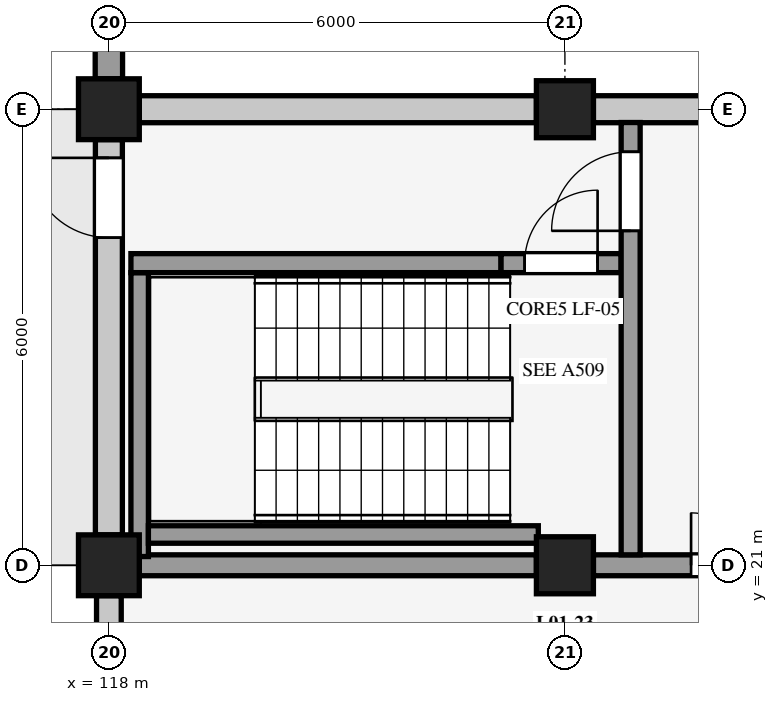
"""IFC4 building model, lengths in metres.
Left out: names, types, materials, properties, quantities, classifications, styles, units other than length and angle.
Written with IfcOpenShell. Run it as: python <this file> out.ifc"""

import sys

from ifc_helpers import new_model, si_unit, direction, frame, frame_2d, origin, origin_2d, place, context, subcontext, project, spatial, rectangle, extrude, element, fill, save


model = new_model("IFC4")
c1 = context("Model", 3, precision=1e-05, world=origin(), true_north=direction((0.0, 1.0)))
c2 = subcontext(c1, "Body", "Model", "MODEL_VIEW")
j1 = project(units=[si_unit("LENGTHUNIT", "METRE"), si_unit("PLANEANGLEUNIT", "RADIAN")], contexts=[c1])
p1 = place(None, origin())
s1 = spatial("IfcSite", under=j1, at=p1, CompositionType="ELEMENT")
p2 = place(p1, origin())
s2 = spatial("IfcBuilding", under=s1, at=p2, CompositionType="ELEMENT")
p3 = place(p2, origin())
s3 = spatial("IfcBuildingStorey", under=s2, at=p3, CompositionType="ELEMENT", Elevation=0.0)
for number, where, z_axis, x_axis in (
    (1, (118.0, 21.0, 0.0), (0.0, 0.0, 1.0), (1.0, 0.0, 0.0)),
    (2, (118.0, 27.0, 0.0), (0.0, 0.0, 1.0), (1.0, 0.0, 0.0)),
):
    element("IfcColumn", number, at=place(p3, frame(where, z_axis=z_axis, x_axis=x_axis)), inside=s3, PredefinedType="COLUMN", context=c2, shape_type="SweptSolid", body=[
        extrude(rectangle(XDim=0.8, YDim=0.8, at=origin_2d()), origin(), (0.0, 0.0, 1.0), 4.5),
    ])
for number, where, z_axis, x_axis in (
    (3, (124.0, 21.0, 0.0), (0.0, 0.0, 1.0), (1.0, 0.0, 0.0)),
    (4, (124.0, 27.0, 0.0), (0.0, 0.0, 1.0), (1.0, 0.0, 0.0)),
):
    element("IfcColumn", number, at=place(p3, frame(where, z_axis=z_axis, x_axis=x_axis)), inside=s3, PredefinedType="COLUMN", context=c2, shape_type="SweptSolid", body=[
        extrude(rectangle(XDim=0.75, YDim=0.75, at=origin_2d()), origin(), (0.0, 0.0, 1.0), 4.5),
    ])
p4 = place(p3, frame((118.0, 27.4, 0.0), z_axis=(0.0, 0.0, 1.0), x_axis=(0.0, 1.0, 0.0)))
e5 = element("IfcWall", 5, at=p4, inside=s3, PredefinedType="USERDEFINED", context=c2, shape_type="SweptSolid", body=[
    extrude(rectangle(XDim=5.2, YDim=0.36, at=frame_2d((2.6, 0.0))), origin(), (0.0, 0.0, 1.0), 4.5),
])
p5 = place(p3, frame((118.0, 15.375, 0.0), z_axis=(0.0, 0.0, 1.0), x_axis=(0.0, 1.0, 0.0)))
e6 = element("IfcWall", 6, at=p5, inside=s3, PredefinedType="SOLIDWALL", context=c2, shape_type="SweptSolid", body=[
    extrude(rectangle(XDim=5.225, YDim=0.325, at=frame_2d((2.613, 0.0))), origin(), (0.0, 0.0, 1.0), 3.809),
])
p6 = place(p5, frame((1.837, 0.0, 0.75)))
e7 = element("IfcOpeningElement", 7, at=p6, cuts=e6, PredefinedType="OPENING", context=c2, shape_type="SweptSolid", body=[
    extrude(rectangle(XDim=1.55, YDim=2.25, at=frame_2d((0.775, 1.125))), frame((0.0, 0.173, 0.0), z_axis=(0.0, -1.0, 0.0), x_axis=(1.0, 0.0, 0.0)), (0.0, 0.0, 1.0), 0.345),
])
p7 = place(p3, frame((118.4, 27.0, 0.0), z_axis=(0.0, 0.0, 1.0), x_axis=(1.0, 0.0, 0.0)))
e8 = element("IfcWall", 8, at=p7, inside=s3, PredefinedType="SOLIDWALL", context=c2, shape_type="SweptSolid", body=[
    extrude(rectangle(XDim=5.225, YDim=0.355, at=frame_2d((2.613, 0.0))), origin(), (0.0, 0.0, 1.0), 3.653),
])
p8 = place(p3, frame((124.375, 27.0, 0.0), z_axis=(0.0, 0.0, 1.0), x_axis=(1.0, 0.0, 0.0)))
e9 = element("IfcWall", 9, at=p8, inside=s3, PredefinedType="SOLIDWALL", context=c2, shape_type="SweptSolid", body=[
    extrude(rectangle(XDim=5.275, YDim=0.355, at=frame_2d((2.637, 0.0))), origin(), (0.0, 0.0, 1.0), 3.756),
])
p9 = place(p3, frame((118.0, 21.4, 0.0), z_axis=(0.0, 0.0, 1.0), x_axis=(0.0, 1.0, 0.0)))
e10 = element("IfcWall", 10, at=p9, inside=s3, PredefinedType="SOLIDWALL", context=c2, shape_type="SweptSolid", body=[
    extrude(rectangle(XDim=5.2, YDim=0.355, at=frame_2d((2.6, 0.0))), origin(), (0.0, 0.0, 1.0), 3.703),
])
p10 = place(p9, frame((3.91, 0.0, 0.0)))
e11 = element("IfcOpeningElement", 11, at=p10, cuts=e10, PredefinedType="OPENING", context=c2, shape_type="SweptSolid", body=[
    extrude(rectangle(XDim=1.05, YDim=2.14, at=frame_2d((0.525, 1.07))), frame((0.0, 0.188, 0.0), z_axis=(0.0, -1.0, 0.0), x_axis=(1.0, 0.0, 0.0)), (0.0, 0.0, 1.0), 0.375),
])
p11 = place(p3, frame((118.4, 21.0, 0.0), z_axis=(0.0, 0.0, 1.0), x_axis=(1.0, 0.0, 0.0)))
e12 = element("IfcWall", 12, at=p11, inside=s3, PredefinedType="SHEAR", context=c2, shape_type="SweptSolid", body=[
    extrude(rectangle(XDim=5.225, YDim=0.275, at=frame_2d((2.613, 0.0))), origin(), (0.0, 0.0, 1.0), 4.216),
])
p12 = place(p3, frame((124.375, 21.0, 0.0), z_axis=(0.0, 0.0, 1.0), x_axis=(1.0, 0.0, 0.0)))
e13 = element("IfcWall", 13, at=p12, inside=s3, PredefinedType="SHEAR", context=c2, shape_type="SweptSolid", body=[
    extrude(rectangle(XDim=5.275, YDim=0.275, at=frame_2d((2.637, 0.0))), origin(), (0.0, 0.0, 1.0), 4.216),
])
p13 = place(p12, frame((1.285, 0.0, 0.0)))
e14 = element("IfcOpeningElement", 14, at=p13, cuts=e13, PredefinedType="OPENING", context=c2, shape_type="SweptSolid", body=[
    extrude(rectangle(XDim=1.38, YDim=2.16, at=frame_2d((0.69, 1.08))), frame((0.0, 0.147, 0.0), z_axis=(0.0, -1.0, 0.0), x_axis=(1.0, 0.0, 0.0)), (0.0, 0.0, 1.0), 0.295),
])
p14 = place(p3, frame((118.405, 21.115, 0.0), z_axis=(0.0, 0.0, 1.0), x_axis=(0.0, 1.0, 0.0)))
e15 = element("IfcWall", 15, at=p14, inside=s3, PredefinedType="SHEAR", context=c2, shape_type="SweptSolid", body=[
    extrude(rectangle(XDim=3.735, YDim=0.23, at=frame_2d((1.868, 0.0))), origin(), (0.0, 0.0, 1.0), 4.5),
])
p15 = place(p3, frame((118.52, 21.405, 0.0), z_axis=(0.0, 0.0, 1.0), x_axis=(1.0, 0.0, 0.0)))
e16 = element("IfcWall", 16, at=p15, inside=s3, PredefinedType="SHEAR", context=c2, shape_type="SweptSolid", body=[
    extrude(rectangle(XDim=5.13, YDim=0.23, at=frame_2d((2.565, 0.0))), origin(), (0.0, 0.0, 1.0), 4.5),
])
p16 = place(p3, frame((118.29, 24.975, 0.0), z_axis=(0.0, 0.0, 1.0), x_axis=(1.0, 0.0, 0.0)))
e17 = element("IfcWall", 17, at=p16, inside=s3, PredefinedType="SHEAR", context=c2, shape_type="SweptSolid", body=[
    extrude(rectangle(XDim=4.87, YDim=0.25, at=frame_2d((2.435, 0.0))), origin(), (0.0, 0.0, 1.0), 4.5),
])
p17 = place(p3, frame((123.16, 24.975, 0.0), z_axis=(0.0, 0.0, 1.0), x_axis=(1.0, 0.0, 0.0)))
e18 = element("IfcWall", 18, at=p17, inside=s3, PredefinedType="SHEAR", context=c2, shape_type="SweptSolid", body=[
    extrude(rectangle(XDim=1.58, YDim=0.25, at=frame_2d((0.79, 0.0))), origin(), (0.0, 0.0, 1.0), 4.216),
])
p18 = place(p17, frame((0.31, 0.0, 0.0)))
e19 = element("IfcOpeningElement", 19, at=p18, cuts=e18, PredefinedType="OPENING", context=c2, shape_type="SweptSolid", body=[
    extrude(rectangle(XDim=0.96, YDim=2.12, at=frame_2d((0.48, 1.06))), frame((0.0, 0.135, 0.0), z_axis=(0.0, -1.0, 0.0), x_axis=(1.0, 0.0, 0.0)), (0.0, 0.0, 1.0), 0.27),
])
p19 = place(p3, frame((124.865, 21.137, 0.0), z_axis=(0.0, 0.0, 1.0), x_axis=(0.0, 1.0, 0.0)))
e20 = element("IfcWall", 20, at=p19, inside=s3, PredefinedType="SHEAR", context=c2, shape_type="SweptSolid", body=[
    extrude(rectangle(XDim=5.688, YDim=0.25, at=frame_2d((2.844, 0.0))), origin(), (0.0, 0.0, 1.0), 4.216),
])
p20 = place(p19, frame((4.262, 0.0, 0.0)))
e21 = element("IfcOpeningElement", 21, at=p20, cuts=e20, PredefinedType="OPENING", context=c2, shape_type="SweptSolid", body=[
    extrude(rectangle(XDim=1.04, YDim=2.14, at=frame_2d((0.52, 1.07))), frame((0.0, 0.135, 0.0), z_axis=(0.0, -1.0, 0.0), x_axis=(1.0, 0.0, 0.0)), (0.0, 0.0, 1.0), 0.27),
])
p21 = place(p10, origin())
e22 = element("IfcDoor", 22, at=p21, inside=s3, OperationType="SINGLE_SWING_RIGHT", PredefinedType="DOOR", context=c2, shape_type="SweptSolid", body=[
    extrude(rectangle(XDim=1.05, YDim=2.14, at=frame_2d((0.525, 1.07))), frame((0.0, 0.025, 0.0), z_axis=(0.0, -1.0, 0.0), x_axis=(1.0, 0.0, 0.0)), (0.0, 0.0, 1.0), 0.05),
])
fill(e11, e22)
p22 = place(p13, origin())
e23 = element("IfcDoor", 23, at=p22, inside=s3, OperationType="DOUBLE_DOOR_SINGLE_SWING", PredefinedType="DOOR", context=c2, shape_type="SweptSolid", body=[
    extrude(rectangle(XDim=1.38, YDim=2.16, at=frame_2d((0.69, 1.08))), frame((0.0, 0.025, 0.0), z_axis=(0.0, -1.0, 0.0), x_axis=(1.0, 0.0, 0.0)), (0.0, 0.0, 1.0), 0.05),
])
fill(e14, e23)
p23 = place(p18, origin())
e24 = element("IfcDoor", 24, at=p23, inside=s3, OperationType="SINGLE_SWING_RIGHT", PredefinedType="DOOR", context=c2, shape_type="SweptSolid", body=[
    extrude(rectangle(XDim=0.96, YDim=2.12, at=frame_2d((0.48, 1.06))), frame((0.0, 0.025, 0.0), z_axis=(0.0, -1.0, 0.0), x_axis=(1.0, 0.0, 0.0)), (0.0, 0.0, 1.0), 0.05),
])
fill(e19, e24)
p24 = place(p20, origin())
e25 = element("IfcDoor", 25, at=p24, inside=s3, OperationType="SINGLE_SWING_LEFT", PredefinedType="DOOR", context=c2, shape_type="SweptSolid", body=[
    extrude(rectangle(XDim=1.04, YDim=2.14, at=frame_2d((0.52, 1.07))), frame((0.0, 0.025, 0.0), z_axis=(0.0, -1.0, 0.0), x_axis=(1.0, 0.0, 0.0)), (0.0, 0.0, 1.0), 0.05),
])
fill(e21, e25)
save(model, sys.argv[1])
